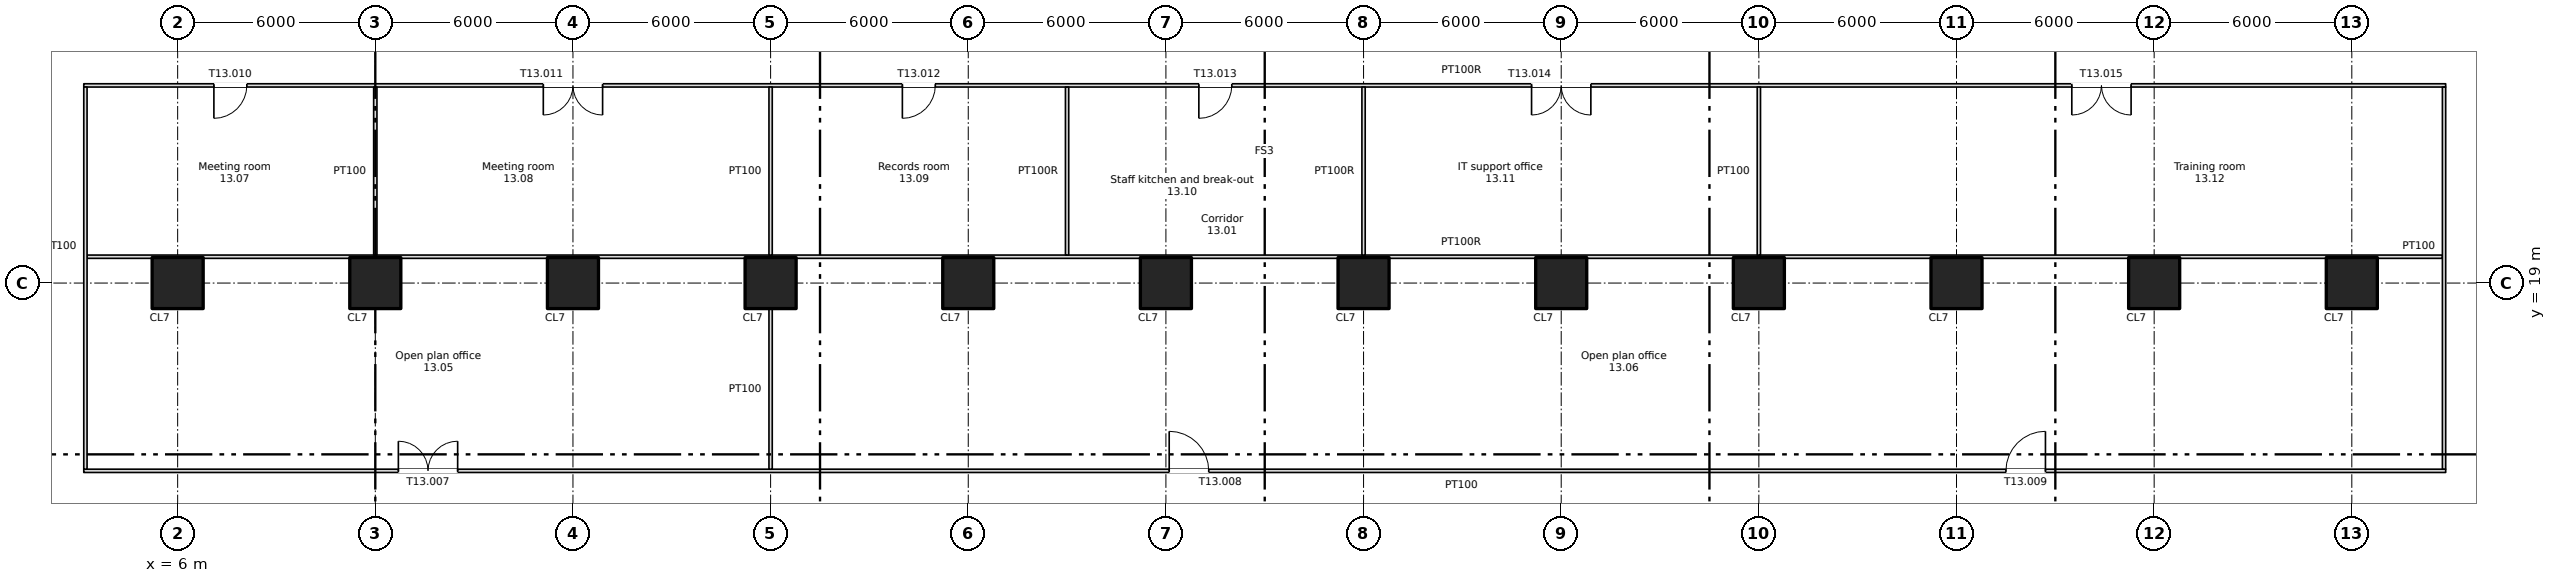
"""IFC4 building model, lengths in metres.
Left out: names, types, materials, properties, quantities, classifications, styles, units other than length and angle.
Written with IfcOpenShell. Run it as: python <this file> out.ifc"""

import sys

from ifc_helpers import new_model, si_unit, direction, frame, frame_2d, origin, origin_2d, place, context, subcontext, project, spatial, rectangle, extrude, element, fill, save


model = new_model("IFC4")
c1 = context("Model", 3, precision=1e-05, world=origin(), true_north=direction((0.0, 1.0)))
c2 = subcontext(c1, "Body", "Model", "MODEL_VIEW")
j1 = project(units=[si_unit("LENGTHUNIT", "METRE"), si_unit("PLANEANGLEUNIT", "RADIAN")], contexts=[c1])
p1 = place(None, origin())
s1 = spatial("IfcSite", under=j1, at=p1, CompositionType="ELEMENT")
p2 = place(p1, origin())
s2 = spatial("IfcBuilding", under=s1, at=p2, CompositionType="ELEMENT")
p3 = place(p2, frame((0.0, 0.0, 71.25)))
s3 = spatial("IfcBuildingStorey", under=s2, at=p3, CompositionType="ELEMENT", Elevation=71.25)
for number, where, z_axis, x_axis in (
    (1, (6.0, 19.0, 0.0), (0.0, 0.0, 1.0), (1.0, 0.0, 0.0)),
    (2, (12.0, 19.0, 0.0), (0.0, 0.0, 1.0), (1.0, 0.0, 0.0)),
    (3, (18.0, 19.0, 0.0), (0.0, 0.0, 1.0), (1.0, 0.0, 0.0)),
    (4, (24.0, 19.0, 0.0), (0.0, 0.0, 1.0), (1.0, 0.0, 0.0)),
    (5, (30.0, 19.0, 0.0), (0.0, 0.0, 1.0), (1.0, 0.0, 0.0)),
    (6, (36.0, 19.0, 0.0), (0.0, 0.0, 1.0), (1.0, 0.0, 0.0)),
    (7, (42.0, 19.0, 0.0), (0.0, 0.0, 1.0), (1.0, 0.0, 0.0)),
    (8, (48.0, 19.0, 0.0), (0.0, 0.0, 1.0), (1.0, 0.0, 0.0)),
    (9, (54.0, 19.0, 0.0), (0.0, 0.0, 1.0), (1.0, 0.0, 0.0)),
    (10, (60.0, 19.0, 0.0), (0.0, 0.0, 1.0), (1.0, 0.0, 0.0)),
    (11, (66.0, 19.0, 0.0), (0.0, 0.0, 1.0), (1.0, 0.0, 0.0)),
    (12, (72.0, 19.0, 0.0), (0.0, 0.0, 1.0), (1.0, 0.0, 0.0)),
):
    element("IfcColumn", number, at=place(p3, frame(where, z_axis=z_axis, x_axis=x_axis)), inside=s3, PredefinedType="COLUMN", context=c2, shape_type="SweptSolid", body=[
        extrude(rectangle(XDim=1.55, YDim=1.55, at=origin_2d()), origin(), (0.0, 0.0, 1.0), 3.35),
    ])
p4 = place(p3, frame((3.15, 13.3, 0.0), z_axis=(0.0, 0.0, 1.0), x_axis=(1.0, 0.0, 0.0)))
e13 = element("IfcWall", 13, at=p4, inside=s3, PredefinedType="PARTITIONING", context=c2, shape_type="SweptSolid", body=[
    extrude(rectangle(XDim=71.7, YDim=0.1, at=frame_2d((35.85, 0.0))), origin(), (0.0, 0.0, 1.0), 3.35),
])
p5 = place(p4, frame((9.55, 0.0, 0.0)))
e14 = element("IfcOpeningElement", 14, at=p5, cuts=e13, PredefinedType="OPENING", context=c2, shape_type="SweptSolid", body=[
    extrude(rectangle(XDim=1.8, YDim=2.1, at=frame_2d((0.9, 1.05))), frame((0.0, 0.06, 0.0), z_axis=(0.0, -1.0, 0.0), x_axis=(1.0, 0.0, 0.0)), (0.0, 0.0, 1.0), 0.12),
])
p6 = place(p4, frame((32.95, 0.0, 0.0)))
e15 = element("IfcOpeningElement", 15, at=p6, cuts=e13, PredefinedType="OPENING", context=c2, shape_type="SweptSolid", body=[
    extrude(rectangle(XDim=1.2, YDim=2.1, at=frame_2d((0.6, 1.05))), frame((0.0, 0.06, 0.0), z_axis=(0.0, -1.0, 0.0), x_axis=(1.0, 0.0, 0.0)), (0.0, 0.0, 1.0), 0.12),
])
p7 = place(p4, frame((58.35, 0.0, 0.0)))
e16 = element("IfcOpeningElement", 16, at=p7, cuts=e13, PredefinedType="OPENING", context=c2, shape_type="SweptSolid", body=[
    extrude(rectangle(XDim=1.2, YDim=2.1, at=frame_2d((0.6, 1.05))), frame((0.0, 0.06, 0.0), z_axis=(0.0, -1.0, 0.0), x_axis=(1.0, 0.0, 0.0)), (0.0, 0.0, 1.0), 0.12),
])
p8 = place(p3, frame((3.25, 19.8, 0.0), z_axis=(0.0, 0.0, 1.0), x_axis=(1.0, 0.0, 0.0)))
e17 = element("IfcWall", 17, at=p8, inside=s3, PredefinedType="PARTITIONING", context=c2, shape_type="SweptSolid", body=[
    extrude(rectangle(XDim=71.5, YDim=0.1, at=frame_2d((35.75, 0.0))), origin(), (0.0, 0.0, 1.0), 3.35),
])
p9 = place(p3, frame((3.15, 25.0, 0.0), z_axis=(0.0, 0.0, 1.0), x_axis=(1.0, 0.0, 0.0)))
e18 = element("IfcWall", 18, at=p9, inside=s3, PredefinedType="PARTITIONING", context=c2, shape_type="SweptSolid", body=[
    extrude(rectangle(XDim=71.7, YDim=0.1, at=frame_2d((35.85, 0.0))), origin(), (0.0, 0.0, 1.0), 3.35),
])
p10 = place(p9, frame((3.95, 0.0, 0.0)))
e19 = element("IfcOpeningElement", 19, at=p10, cuts=e18, PredefinedType="OPENING", context=c2, shape_type="SweptSolid", body=[
    extrude(rectangle(XDim=1.0, YDim=2.1, at=frame_2d((0.5, 1.05))), frame((0.0, 0.06, 0.0), z_axis=(0.0, -1.0, 0.0), x_axis=(1.0, 0.0, 0.0)), (0.0, 0.0, 1.0), 0.12),
])
p11 = place(p9, frame((13.95, 0.0, 0.0)))
e20 = element("IfcOpeningElement", 20, at=p11, cuts=e18, PredefinedType="OPENING", context=c2, shape_type="SweptSolid", body=[
    extrude(rectangle(XDim=1.8, YDim=2.1, at=frame_2d((0.9, 1.05))), frame((0.0, 0.06, 0.0), z_axis=(0.0, -1.0, 0.0), x_axis=(1.0, 0.0, 0.0)), (0.0, 0.0, 1.0), 0.12),
])
p12 = place(p9, frame((24.85, 0.0, 0.0)))
e21 = element("IfcOpeningElement", 21, at=p12, cuts=e18, PredefinedType="OPENING", context=c2, shape_type="SweptSolid", body=[
    extrude(rectangle(XDim=1.0, YDim=2.1, at=frame_2d((0.5, 1.05))), frame((0.0, 0.06, 0.0), z_axis=(0.0, -1.0, 0.0), x_axis=(1.0, 0.0, 0.0)), (0.0, 0.0, 1.0), 0.12),
])
p13 = place(p9, frame((33.85, 0.0, 0.0)))
e22 = element("IfcOpeningElement", 22, at=p13, cuts=e18, PredefinedType="OPENING", context=c2, shape_type="SweptSolid", body=[
    extrude(rectangle(XDim=1.0, YDim=2.1, at=frame_2d((0.5, 1.05))), frame((0.0, 0.06, 0.0), z_axis=(0.0, -1.0, 0.0), x_axis=(1.0, 0.0, 0.0)), (0.0, 0.0, 1.0), 0.12),
])
p14 = place(p9, frame((43.95, 0.0, 0.0)))
e23 = element("IfcOpeningElement", 23, at=p14, cuts=e18, PredefinedType="OPENING", context=c2, shape_type="SweptSolid", body=[
    extrude(rectangle(XDim=1.8, YDim=2.1, at=frame_2d((0.9, 1.05))), frame((0.0, 0.06, 0.0), z_axis=(0.0, -1.0, 0.0), x_axis=(1.0, 0.0, 0.0)), (0.0, 0.0, 1.0), 0.12),
])
p15 = place(p9, frame((60.35, 0.0, 0.0)))
e24 = element("IfcOpeningElement", 24, at=p15, cuts=e18, PredefinedType="OPENING", context=c2, shape_type="SweptSolid", body=[
    extrude(rectangle(XDim=1.8, YDim=2.1, at=frame_2d((0.9, 1.05))), frame((0.0, 0.06, 0.0), z_axis=(0.0, -1.0, 0.0), x_axis=(1.0, 0.0, 0.0)), (0.0, 0.0, 1.0), 0.12),
])
p16 = place(p3, frame((3.2, 13.35, 0.0), z_axis=(0.0, 0.0, 1.0), x_axis=(0.0, 1.0, 0.0)))
e25 = element("IfcWall", 25, at=p16, inside=s3, PredefinedType="PARTITIONING", context=c2, shape_type="SweptSolid", body=[
    extrude(rectangle(XDim=11.6, YDim=0.1, at=frame_2d((5.8, 0.0))), origin(), (0.0, 0.0, 1.0), 3.35),
])
p17 = place(p3, frame((12.0, 19.85, 0.0), z_axis=(0.0, 0.0, 1.0), x_axis=(0.0, 1.0, 0.0)))
e26 = element("IfcWall", 26, at=p17, inside=s3, PredefinedType="PARTITIONING", context=c2, shape_type="SweptSolid", body=[
    extrude(rectangle(XDim=5.1, YDim=0.1, at=frame_2d((2.55, 0.0))), origin(), (0.0, 0.0, 1.0), 3.35),
])
p18 = place(p3, frame((24.0, 13.35, 0.0), z_axis=(0.0, 0.0, 1.0), x_axis=(0.0, 1.0, 0.0)))
e27 = element("IfcWall", 27, at=p18, inside=s3, PredefinedType="PARTITIONING", context=c2, shape_type="SweptSolid", body=[
    extrude(rectangle(XDim=4.875, YDim=0.1, at=frame_2d((2.438, 0.0))), origin(), (0.0, 0.0, 1.0), 3.35),
])
for number, where, z_axis, x_axis in (
    (28, (24.0, 19.85, 0.0), (0.0, 0.0, 1.0), (0.0, 1.0, 0.0)),
    (29, (33.0, 19.85, 0.0), (0.0, 0.0, 1.0), (0.0, 1.0, 0.0)),
    (30, (42.0, 19.85, 0.0), (0.0, 0.0, 1.0), (0.0, 1.0, 0.0)),
    (31, (54.0, 19.85, 0.0), (0.0, 0.0, 1.0), (0.0, 1.0, 0.0)),
):
    element("IfcWall", number, at=place(p3, frame(where, z_axis=z_axis, x_axis=x_axis)), inside=s3, PredefinedType="PARTITIONING", context=c2, shape_type="SweptSolid", body=[
        extrude(rectangle(XDim=5.1, YDim=0.1, at=frame_2d((2.55, 0.0))), origin(), (0.0, 0.0, 1.0), 3.35),
    ])
p19 = place(p3, frame((74.8, 13.35, 0.0), z_axis=(0.0, 0.0, 1.0), x_axis=(0.0, 1.0, 0.0)))
e32 = element("IfcWall", 32, at=p19, inside=s3, PredefinedType="PARTITIONING", context=c2, shape_type="SweptSolid", body=[
    extrude(rectangle(XDim=11.6, YDim=0.1, at=frame_2d((5.8, 0.0))), origin(), (0.0, 0.0, 1.0), 3.35),
])
p20 = place(p5, origin())
e33 = element("IfcDoor", 33, at=p20, inside=s3, OperationType="DOUBLE_DOOR_SINGLE_SWING", PredefinedType="DOOR", context=c2, shape_type="SweptSolid", body=[
    extrude(rectangle(XDim=1.8, YDim=2.1, at=frame_2d((0.9, 1.05))), frame((0.0, 0.025, 0.0), z_axis=(0.0, -1.0, 0.0), x_axis=(1.0, 0.0, 0.0)), (0.0, 0.0, 1.0), 0.05),
])
fill(e14, e33)
p21 = place(p6, origin())
e34 = element("IfcDoor", 34, at=p21, inside=s3, OperationType="SINGLE_SWING_LEFT", PredefinedType="DOOR", context=c2, shape_type="SweptSolid", body=[
    extrude(rectangle(XDim=1.2, YDim=2.1, at=frame_2d((0.6, 1.05))), frame((0.0, 0.025, 0.0), z_axis=(0.0, -1.0, 0.0), x_axis=(1.0, 0.0, 0.0)), (0.0, 0.0, 1.0), 0.05),
])
fill(e15, e34)
p22 = place(p7, origin())
e35 = element("IfcDoor", 35, at=p22, inside=s3, OperationType="SINGLE_SWING_RIGHT", PredefinedType="DOOR", context=c2, shape_type="SweptSolid", body=[
    extrude(rectangle(XDim=1.2, YDim=2.1, at=frame_2d((0.6, 1.05))), frame((0.0, 0.025, 0.0), z_axis=(0.0, -1.0, 0.0), x_axis=(1.0, 0.0, 0.0)), (0.0, 0.0, 1.0), 0.05),
])
fill(e16, e35)
p23 = place(p10, origin())
e36 = element("IfcDoor", 36, at=p23, inside=s3, OperationType="SINGLE_SWING_LEFT", PredefinedType="DOOR", context=c2, shape_type="SweptSolid", body=[
    extrude(rectangle(XDim=1.0, YDim=2.1, at=frame_2d((0.5, 1.05))), frame((0.0, 0.025, 0.0), z_axis=(0.0, -1.0, 0.0), x_axis=(1.0, 0.0, 0.0)), (0.0, 0.0, 1.0), 0.05),
])
fill(e19, e36)
p24 = place(p11, origin())
e37 = element("IfcDoor", 37, at=p24, inside=s3, OperationType="DOUBLE_DOOR_SINGLE_SWING", PredefinedType="DOOR", context=c2, shape_type="SweptSolid", body=[
    extrude(rectangle(XDim=1.8, YDim=2.1, at=frame_2d((0.9, 1.05))), frame((0.0, 0.025, 0.0), z_axis=(0.0, -1.0, 0.0), x_axis=(1.0, 0.0, 0.0)), (0.0, 0.0, 1.0), 0.05),
])
fill(e20, e37)
p25 = place(p12, origin())
e38 = element("IfcDoor", 38, at=p25, inside=s3, OperationType="SINGLE_SWING_LEFT", PredefinedType="DOOR", context=c2, shape_type="SweptSolid", body=[
    extrude(rectangle(XDim=1.0, YDim=2.1, at=frame_2d((0.5, 1.05))), frame((0.0, 0.025, 0.0), z_axis=(0.0, -1.0, 0.0), x_axis=(1.0, 0.0, 0.0)), (0.0, 0.0, 1.0), 0.05),
])
fill(e21, e38)
p26 = place(p13, origin())
e39 = element("IfcDoor", 39, at=p26, inside=s3, OperationType="SINGLE_SWING_LEFT", PredefinedType="DOOR", context=c2, shape_type="SweptSolid", body=[
    extrude(rectangle(XDim=1.0, YDim=2.1, at=frame_2d((0.5, 1.05))), frame((0.0, 0.025, 0.0), z_axis=(0.0, -1.0, 0.0), x_axis=(1.0, 0.0, 0.0)), (0.0, 0.0, 1.0), 0.05),
])
fill(e22, e39)
p27 = place(p14, origin())
e40 = element("IfcDoor", 40, at=p27, inside=s3, OperationType="DOUBLE_DOOR_SINGLE_SWING", PredefinedType="DOOR", context=c2, shape_type="SweptSolid", body=[
    extrude(rectangle(XDim=1.8, YDim=2.1, at=frame_2d((0.9, 1.05))), frame((0.0, 0.025, 0.0), z_axis=(0.0, -1.0, 0.0), x_axis=(1.0, 0.0, 0.0)), (0.0, 0.0, 1.0), 0.05),
])
fill(e23, e40)
p28 = place(p15, origin())
e41 = element("IfcDoor", 41, at=p28, inside=s3, OperationType="DOUBLE_DOOR_SINGLE_SWING", PredefinedType="DOOR", context=c2, shape_type="SweptSolid", body=[
    extrude(rectangle(XDim=1.8, YDim=2.1, at=frame_2d((0.9, 1.05))), frame((0.0, 0.025, 0.0), z_axis=(0.0, -1.0, 0.0), x_axis=(1.0, 0.0, 0.0)), (0.0, 0.0, 1.0), 0.05),
])
fill(e24, e41)
save(model, sys.argv[1])
